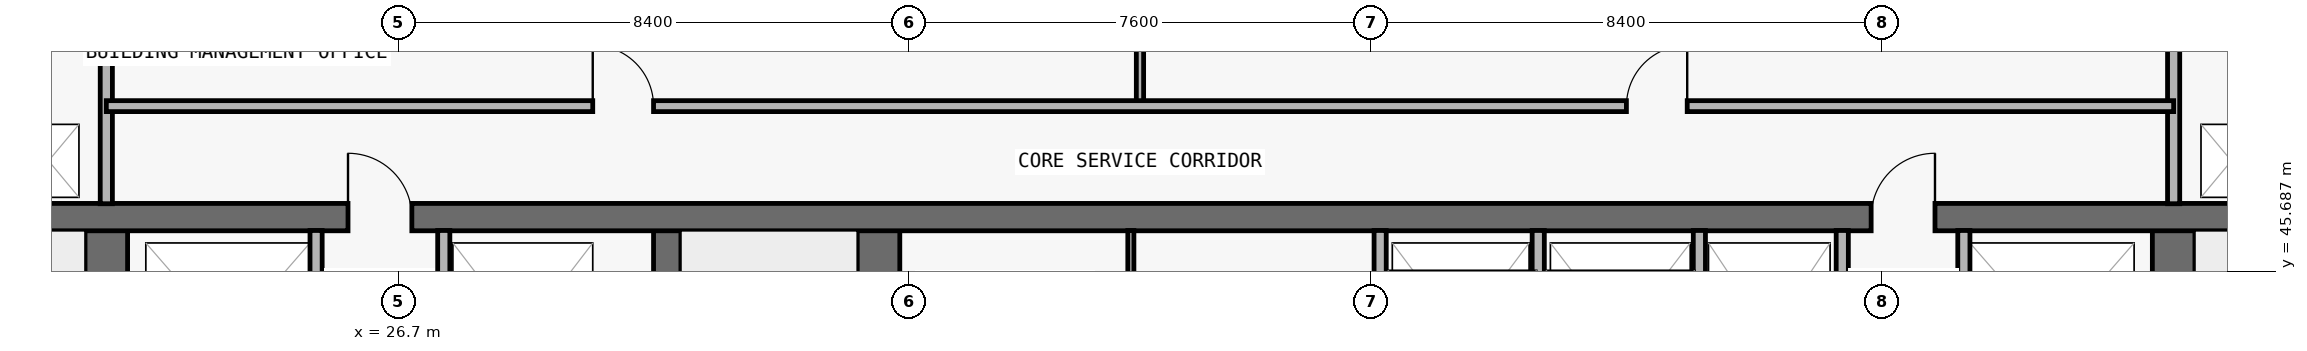
"""IFC4 building model, lengths in metres.
Left out: names, types, materials, properties, quantities, classifications, styles, units other than length and angle.
Written with IfcOpenShell. Run it as: python <this file> out.ifc"""

import sys

from ifc_helpers import new_model, si_unit, direction, frame, frame_2d, origin, place, context, subcontext, project, spatial, rectangle, extrude, element, fill, save


model = new_model("IFC4")
c1 = context("Model", 3, precision=1e-05, world=origin(), true_north=direction((0.0, 1.0)))
c2 = subcontext(c1, "Body", "Model", "MODEL_VIEW")
j1 = project(units=[si_unit("LENGTHUNIT", "METRE"), si_unit("PLANEANGLEUNIT", "RADIAN")], contexts=[c1])
p1 = place(None, origin())
s1 = spatial("IfcSite", under=j1, at=p1, CompositionType="ELEMENT")
p2 = place(p1, origin())
s2 = spatial("IfcBuilding", under=s1, at=p2, CompositionType="ELEMENT")
p3 = place(p2, frame((0.0, 0.0, 177.0)))
s3 = spatial("IfcBuildingStorey", under=s2, at=p3, CompositionType="ELEMENT", Elevation=177.0)
p4 = place(p3, frame((21.9, 37.0, 0.0), z_axis=(0.0, 0.0, 1.0), x_axis=(0.0, 1.0, 0.0)))
e1 = element("IfcWall", 1, at=p4, inside=s3, PredefinedType="SHEAR", context=c2, shape_type="SweptSolid", body=[
    extrude(rectangle(XDim=9.575, YDim=0.7, at=frame_2d((4.788, 0.0))), origin(), (0.0, 0.0, 1.0), 3.05),
])
p5 = place(p4, frame((0.55, 0.0, 0.0)))
e2 = element("IfcOpeningElement", 2, at=p5, cuts=e1, PredefinedType="OPENING", context=c2, shape_type="SweptSolid", body=[
    extrude(rectangle(XDim=1.1, YDim=2.15, at=frame_2d((0.55, 1.075))), frame((0.0, 0.36, 0.0), z_axis=(0.0, -1.0, 0.0), x_axis=(1.0, 0.0, 0.0)), (0.0, 0.0, 1.0), 0.72),
])
p6 = place(p3, frame((55.9, 37.0, 0.0), z_axis=(0.0, 0.0, 1.0), x_axis=(0.0, 1.0, 0.0)))
e3 = element("IfcWall", 3, at=p6, inside=s3, PredefinedType="SHEAR", context=c2, shape_type="SweptSolid", body=[
    extrude(rectangle(XDim=9.575, YDim=0.7, at=frame_2d((4.788, 0.0))), origin(), (0.0, 0.0, 1.0), 3.05),
])
p7 = place(p6, frame((0.55, 0.0, 0.0)))
e4 = element("IfcOpeningElement", 4, at=p7, cuts=e3, PredefinedType="OPENING", context=c2, shape_type="SweptSolid", body=[
    extrude(rectangle(XDim=1.1, YDim=2.15, at=frame_2d((0.55, 1.075))), frame((0.0, 0.36, 0.0), z_axis=(0.0, -1.0, 0.0), x_axis=(1.0, 0.0, 0.0)), (0.0, 0.0, 1.0), 0.72),
])
p8 = place(p3, frame((31.125, 37.0, 0.0), z_axis=(0.0, 0.0, 1.0), x_axis=(0.0, 1.0, 0.0)))
e5 = element("IfcWall", 5, at=p8, inside=s3, PredefinedType="SHEAR", context=c2, shape_type="SweptSolid", body=[
    extrude(rectangle(XDim=9.575, YDim=0.45, at=frame_2d((4.788, 0.0))), origin(), (0.0, 0.0, 1.0), 3.05),
])
p9 = place(p3, frame((34.6, 37.0, 0.0), z_axis=(0.0, 0.0, 1.0), x_axis=(0.0, 1.0, 0.0)))
e6 = element("IfcWall", 6, at=p9, inside=s3, PredefinedType="SHEAR", context=c2, shape_type="SweptSolid", body=[
    extrude(rectangle(XDim=9.575, YDim=0.7, at=frame_2d((4.788, 0.0))), origin(), (0.0, 0.0, 1.0), 3.05),
])
p10 = place(p3, frame((18.3, 46.575, 0.0), z_axis=(0.0, 0.0, 1.0), x_axis=(1.0, 0.0, 0.0)))
e7 = element("IfcWall", 7, at=p10, inside=s3, PredefinedType="SHEAR", context=c2, shape_type="SweptSolid", body=[
    extrude(rectangle(XDim=41.2, YDim=0.45, at=frame_2d((20.6, 0.0))), origin(), (0.0, 0.0, 1.0), 3.05),
])
p11 = place(p10, frame((7.575, 0.0, 0.0)))
e8 = element("IfcOpeningElement", 8, at=p11, cuts=e7, PredefinedType="OPENING", context=c2, shape_type="SweptSolid", body=[
    extrude(rectangle(XDim=1.05, YDim=2.15, at=frame_2d((0.525, 1.075))), frame((0.0, 0.235, 0.0), z_axis=(0.0, -1.0, 0.0), x_axis=(1.0, 0.0, 0.0)), (0.0, 0.0, 1.0), 0.47),
])
p12 = place(p10, frame((32.625, 0.0, 0.0)))
e9 = element("IfcOpeningElement", 9, at=p12, cuts=e7, PredefinedType="OPENING", context=c2, shape_type="SweptSolid", body=[
    extrude(rectangle(XDim=1.05, YDim=2.15, at=frame_2d((0.525, 1.075))), frame((0.0, 0.235, 0.0), z_axis=(0.0, -1.0, 0.0), x_axis=(1.0, 0.0, 0.0)), (0.0, 0.0, 1.0), 0.47),
])
p13 = place(p3, frame((21.9, 46.795, 0.0), z_axis=(0.0, 0.0, 1.0), x_axis=(0.0, 1.0, 0.0)))
e10 = element("IfcWall", 10, at=p13, inside=s3, PredefinedType="PARTITIONING", context=c2, shape_type="SweptSolid", body=[
    extrude(rectangle(XDim=3.16, YDim=0.2, at=frame_2d((1.58, 0.0))), origin(), (0.0, 0.0, 1.0), 3.05),
])
for number, where, z_axis, x_axis in (
    (11, (25.35, 43.17, 0.0), (0.0, 0.0, 1.0), (0.0, 1.0, 0.0)),
    (12, (27.45, 43.17, 0.0), (0.0, 0.0, 1.0), (0.0, 1.0, 0.0)),
):
    element("IfcWall", number, at=place(p3, frame(where, z_axis=z_axis, x_axis=x_axis)), inside=s3, PredefinedType="PARTITIONING", context=c2, shape_type="SweptSolid", body=[
        extrude(rectangle(XDim=3.185, YDim=0.2, at=frame_2d((1.593, 0.0))), origin(), (0.0, 0.0, 1.0), 3.05),
    ])
p14 = place(p3, frame((38.75, 43.17, 0.0), z_axis=(0.0, 0.0, 1.0), x_axis=(0.0, 1.0, 0.0)))
e13 = element("IfcWall", 13, at=p14, inside=s3, PredefinedType="MOVABLE", context=c2, shape_type="SweptSolid", body=[
    extrude(rectangle(XDim=3.185, YDim=0.1, at=frame_2d((1.593, 0.0))), origin(), (0.0, 0.0, 1.0), 3.05),
])
p15 = place(p3, frame((38.9, 48.4, 0.0), z_axis=(0.0, 0.0, 1.0), x_axis=(0.0, 1.0, 0.0)))
e14 = element("IfcWall", 14, at=p15, inside=s3, PredefinedType="PARTITIONING", context=c2, shape_type="SweptSolid", body=[
    extrude(rectangle(XDim=1.555, YDim=0.12, at=frame_2d((0.778, 0.0))), origin(), (0.0, 0.0, 1.0), 3.05),
])
for number, where, z_axis, x_axis in (
    (15, (42.85, 43.17, 0.0), (0.0, 0.0, 1.0), (0.0, 1.0, 0.0)),
    (16, (45.45, 43.17, 0.0), (0.0, 0.0, 1.0), (0.0, 1.0, 0.0)),
    (17, (48.1, 43.17, 0.0), (0.0, 0.0, 1.0), (0.0, 1.0, 0.0)),
    (18, (50.45, 43.17, 0.0), (0.0, 0.0, 1.0), (0.0, 1.0, 0.0)),
    (19, (52.45, 43.17, 0.0), (0.0, 0.0, 1.0), (0.0, 1.0, 0.0)),
):
    element("IfcWall", number, at=place(p3, frame(where, z_axis=z_axis, x_axis=x_axis)), inside=s3, PredefinedType="PARTITIONING", context=c2, shape_type="SweptSolid", body=[
        extrude(rectangle(XDim=3.185, YDim=0.2, at=frame_2d((1.593, 0.0))), origin(), (0.0, 0.0, 1.0), 3.05),
    ])
p16 = place(p3, frame((55.9, 46.795, 0.0), z_axis=(0.0, 0.0, 1.0), x_axis=(0.0, 1.0, 0.0)))
e20 = element("IfcWall", 20, at=p16, inside=s3, PredefinedType="PARTITIONING", context=c2, shape_type="SweptSolid", body=[
    extrude(rectangle(XDim=3.16, YDim=0.2, at=frame_2d((1.58, 0.0))), origin(), (0.0, 0.0, 1.0), 3.05),
])
p17 = place(p3, frame((21.9, 48.4, 0.0), z_axis=(0.0, 0.0, 1.0), x_axis=(1.0, 0.0, 0.0)))
e21 = element("IfcWall", 21, at=p17, inside=s3, PredefinedType="PARTITIONING", context=c2, shape_type="SweptSolid", body=[
    extrude(rectangle(XDim=34.0, YDim=0.18, at=frame_2d((17.0, 0.0))), origin(), (0.0, 0.0, 1.0), 3.05),
])
p18 = place(p17, frame((8.0, 0.0, 0.0)))
e22 = element("IfcOpeningElement", 22, at=p18, cuts=e21, PredefinedType="OPENING", context=c2, shape_type="SweptSolid", body=[
    extrude(rectangle(XDim=1.0, YDim=2.2, at=frame_2d((0.5, 1.1))), frame((0.0, 0.1, 0.0), z_axis=(0.0, -1.0, 0.0), x_axis=(1.0, 0.0, 0.0)), (0.0, 0.0, 1.0), 0.2),
])
p19 = place(p17, frame((25.0, 0.0, 0.0)))
e23 = element("IfcOpeningElement", 23, at=p19, cuts=e21, PredefinedType="OPENING", context=c2, shape_type="SweptSolid", body=[
    extrude(rectangle(XDim=1.0, YDim=2.2, at=frame_2d((0.5, 1.1))), frame((0.0, 0.1, 0.0), z_axis=(0.0, -1.0, 0.0), x_axis=(1.0, 0.0, 0.0)), (0.0, 0.0, 1.0), 0.2),
])
p20 = place(p11, origin())
e24 = element("IfcDoor", 24, at=p20, inside=s3, OperationType="SINGLE_SWING_LEFT", PredefinedType="DOOR", context=c2, shape_type="SweptSolid", body=[
    extrude(rectangle(XDim=1.05, YDim=2.15, at=frame_2d((0.525, 1.075))), frame((0.0, 0.025, 0.0), z_axis=(0.0, -1.0, 0.0), x_axis=(1.0, 0.0, 0.0)), (0.0, 0.0, 1.0), 0.05),
])
fill(e8, e24)
p21 = place(p12, origin())
e25 = element("IfcDoor", 25, at=p21, inside=s3, OperationType="SINGLE_SWING_RIGHT", PredefinedType="DOOR", context=c2, shape_type="SweptSolid", body=[
    extrude(rectangle(XDim=1.05, YDim=2.15, at=frame_2d((0.525, 1.075))), frame((0.0, 0.025, 0.0), z_axis=(0.0, -1.0, 0.0), x_axis=(1.0, 0.0, 0.0)), (0.0, 0.0, 1.0), 0.05),
])
fill(e9, e25)
p22 = place(p18, origin())
e26 = element("IfcDoor", 26, at=p22, inside=s3, OperationType="SINGLE_SWING_LEFT", PredefinedType="DOOR", context=c2, shape_type="SweptSolid", body=[
    extrude(rectangle(XDim=1.0, YDim=2.2, at=frame_2d((0.5, 1.1))), frame((0.0, 0.025, 0.0), z_axis=(0.0, -1.0, 0.0), x_axis=(1.0, 0.0, 0.0)), (0.0, 0.0, 1.0), 0.05),
])
fill(e22, e26)
p23 = place(p19, origin())
e27 = element("IfcDoor", 27, at=p23, inside=s3, OperationType="SINGLE_SWING_RIGHT", PredefinedType="DOOR", context=c2, shape_type="SweptSolid", body=[
    extrude(rectangle(XDim=1.0, YDim=2.2, at=frame_2d((0.5, 1.1))), frame((0.0, 0.025, 0.0), z_axis=(0.0, -1.0, 0.0), x_axis=(1.0, 0.0, 0.0)), (0.0, 0.0, 1.0), 0.05),
])
fill(e23, e27)
save(model, sys.argv[1])
